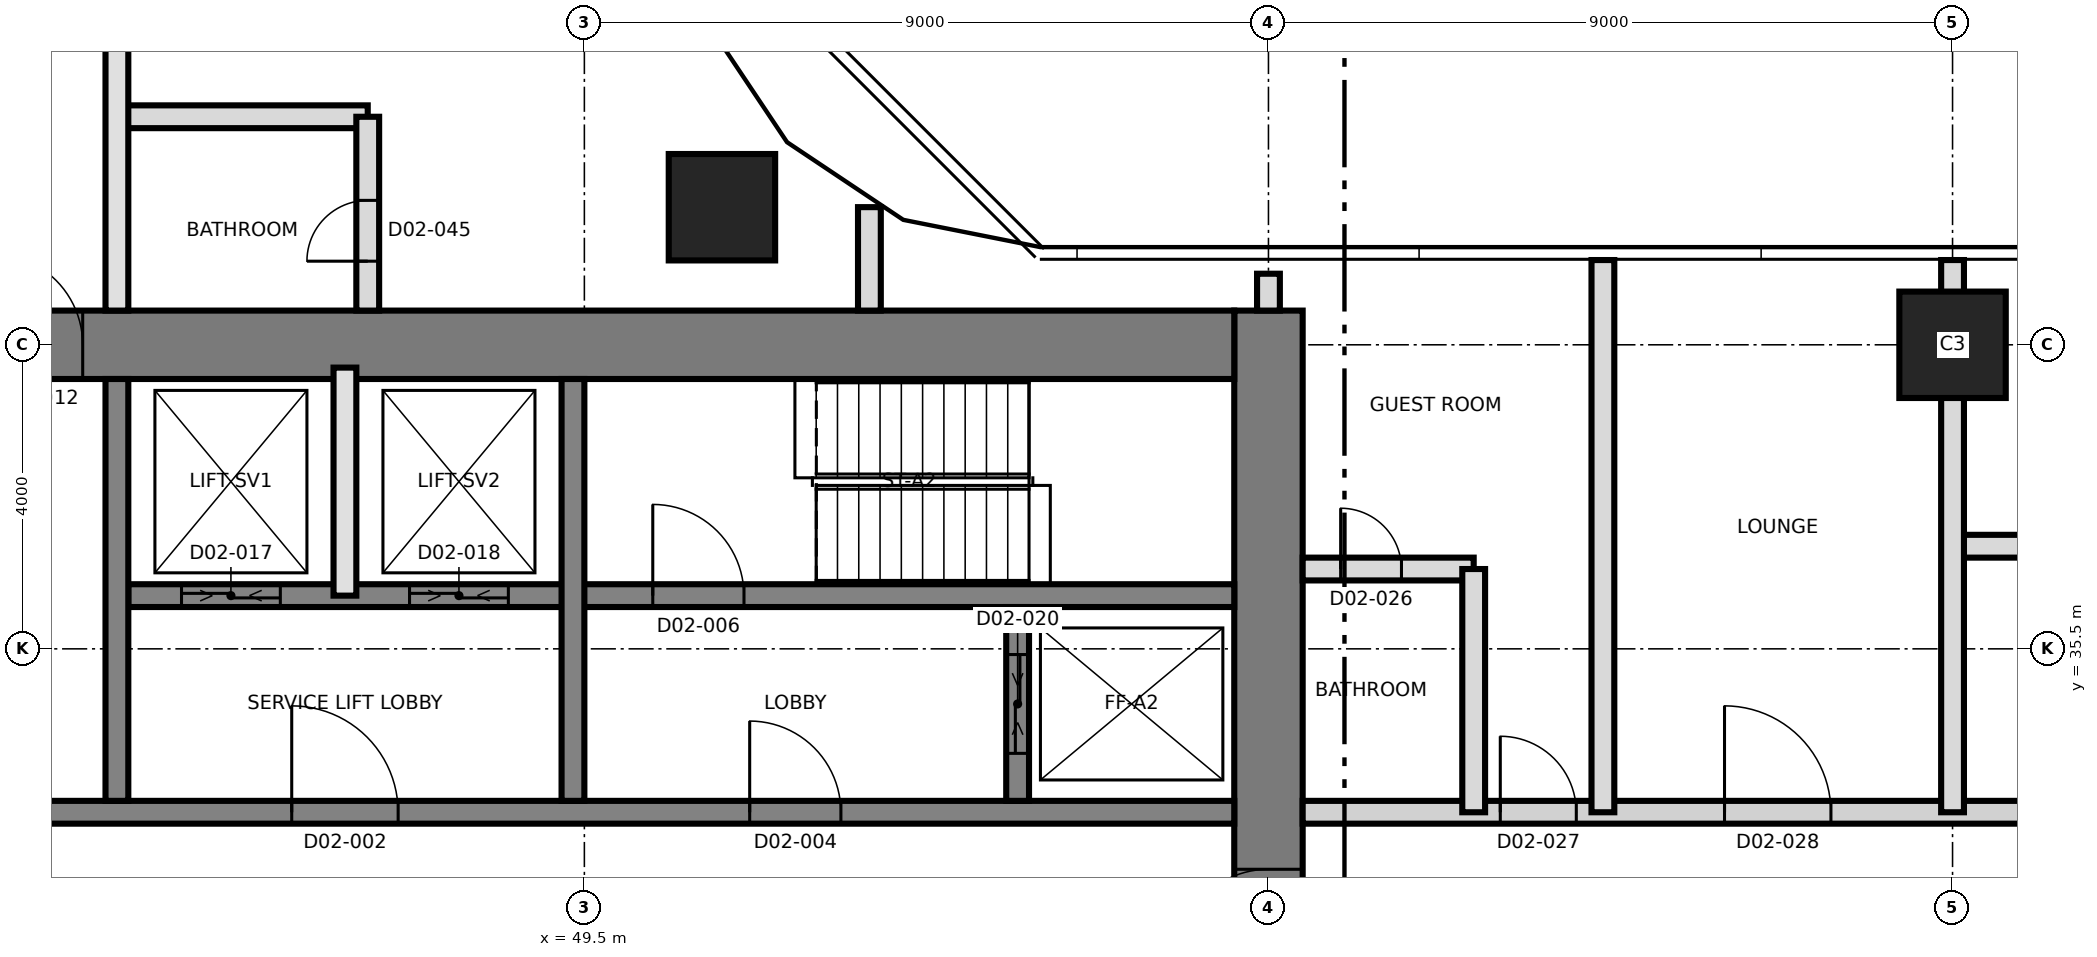
"""IFC4 building model, lengths in metres.
Left out: names, types, materials, properties, quantities, classifications, styles, units other than length and angle.
Written with IfcOpenShell. Run it as: python <this file> out.ifc"""

import sys

from ifc_helpers import new_model, si_unit, direction, frame, frame_2d, origin, origin_2d, place, context, subcontext, project, spatial, rectangle, extrude, element, fill, save


model = new_model("IFC4")
c1 = context("Model", 3, precision=1e-05, world=origin(), true_north=direction((0.0, 1.0)))
c2 = subcontext(c1, "Body", "Model", "MODEL_VIEW")
j1 = project(units=[si_unit("LENGTHUNIT", "METRE"), si_unit("PLANEANGLEUNIT", "RADIAN")], contexts=[c1])
p1 = place(None, origin())
s1 = spatial("IfcSite", under=j1, at=p1, CompositionType="ELEMENT")
p2 = place(p1, origin())
s2 = spatial("IfcBuilding", under=s1, at=p2, CompositionType="ELEMENT")
p3 = place(p2, frame((0.0, 0.0, 44.6)))
s3 = spatial("IfcBuildingStorey", under=s2, at=p3, CompositionType="ELEMENT", Elevation=44.6)
p4 = place(p3, frame((58.5, 21.05, 0.0), z_axis=(0.0, 0.0, 1.0), x_axis=(0.0, 1.0, 0.0)))
e1 = element("IfcWall", 1, at=p4, inside=s3, PredefinedType="SHEAR", context=c2, shape_type="SweptSolid", body=[
    extrude(rectangle(XDim=18.9, YDim=0.9, at=frame_2d((9.45, 0.0))), origin(), (0.0, 0.0, 1.0), 3.7),
])
p5 = place(p4, frame((10.35, 0.0, 0.0)))
e2 = element("IfcOpeningElement", 2, at=p5, cuts=e1, PredefinedType="OPENING", context=c2, shape_type="SweptSolid", body=[
    extrude(rectangle(XDim=1.2, YDim=2.1, at=frame_2d((0.6, 1.05))), frame((0.0, 0.46, 0.0), z_axis=(0.0, -1.0, 0.0), x_axis=(1.0, 0.0, 0.0)), (0.0, 0.0, 1.0), 0.92),
])
p6 = place(p3, frame((31.05, 39.5, 0.0), z_axis=(0.0, 0.0, 1.0), x_axis=(1.0, 0.0, 0.0)))
e3 = element("IfcWall", 3, at=p6, inside=s3, PredefinedType="SHEAR", context=c2, shape_type="SweptSolid", body=[
    extrude(rectangle(XDim=27.0, YDim=0.9, at=frame_2d((13.5, 0.0))), origin(), (0.0, 0.0, 1.0), 3.7),
])
p7 = place(p6, frame((10.65, 0.0, 0.0)))
e4 = element("IfcOpeningElement", 4, at=p7, cuts=e3, PredefinedType="OPENING", context=c2, shape_type="SweptSolid", body=[
    extrude(rectangle(XDim=1.2, YDim=2.1, at=frame_2d((0.6, 1.05))), frame((0.0, 0.46, 0.0), z_axis=(0.0, -1.0, 0.0), x_axis=(1.0, 0.0, 0.0)), (0.0, 0.0, 1.0), 0.92),
])
p8 = place(p3, frame((31.95, 33.35, 0.0), z_axis=(0.0, 0.0, 1.0), x_axis=(1.0, 0.0, 0.0)))
e5 = element("IfcWall", 5, at=p8, inside=s3, PredefinedType="SHEAR", context=c2, shape_type="SweptSolid", body=[
    extrude(rectangle(XDim=26.1, YDim=0.3, at=frame_2d((13.05, 0.0))), origin(), (0.0, 0.0, 1.0), 3.7),
])
p9 = place(p8, frame((13.7, 0.0, 0.0)))
e6 = element("IfcOpeningElement", 6, at=p9, cuts=e5, PredefinedType="OPENING", context=c2, shape_type="SweptSolid", body=[
    extrude(rectangle(XDim=1.4, YDim=2.1, at=frame_2d((0.7, 1.05))), frame((0.0, 0.16, 0.0), z_axis=(0.0, -1.0, 0.0), x_axis=(1.0, 0.0, 0.0)), (0.0, 0.0, 1.0), 0.32),
])
p10 = place(p8, frame((5.175, 0.0, 0.0)))
e7 = element("IfcOpeningElement", 7, at=p10, cuts=e5, PredefinedType="OPENING", context=c2, shape_type="SweptSolid", body=[
    extrude(rectangle(XDim=1.2, YDim=2.1, at=frame_2d((0.6, 1.05))), frame((0.0, 0.16, 0.0), z_axis=(0.0, -1.0, 0.0), x_axis=(1.0, 0.0, 0.0)), (0.0, 0.0, 1.0), 0.32),
])
p11 = place(p8, frame((19.725, 0.0, 0.0)))
e8 = element("IfcOpeningElement", 8, at=p11, cuts=e5, PredefinedType="OPENING", context=c2, shape_type="SweptSolid", body=[
    extrude(rectangle(XDim=1.2, YDim=2.1, at=frame_2d((0.6, 1.05))), frame((0.0, 0.16, 0.0), z_axis=(0.0, -1.0, 0.0), x_axis=(1.0, 0.0, 0.0)), (0.0, 0.0, 1.0), 0.32),
])
p12 = place(p3, frame((43.5, 36.2, 0.0), z_axis=(0.0, 0.0, 1.0), x_axis=(1.0, 0.0, 0.0)))
e9 = element("IfcWall", 9, at=p12, inside=s3, PredefinedType="SHEAR", context=c2, shape_type="SweptSolid", body=[
    extrude(rectangle(XDim=14.55, YDim=0.3, at=frame_2d((7.275, 0.0))), origin(), (0.0, 0.0, 1.0), 3.7),
])
p13 = place(p12, frame((6.9, 0.0, 0.0)))
e10 = element("IfcOpeningElement", 10, at=p13, cuts=e9, PredefinedType="OPENING", context=c2, shape_type="SweptSolid", body=[
    extrude(rectangle(XDim=1.2, YDim=2.1, at=frame_2d((0.6, 1.05))), frame((0.0, 0.16, 0.0), z_axis=(0.0, -1.0, 0.0), x_axis=(1.0, 0.0, 0.0)), (0.0, 0.0, 1.0), 0.32),
])
p14 = place(p12, frame((0.7, 0.0, 0.0)))
e11 = element("IfcOpeningElement", 11, at=p14, cuts=e9, PredefinedType="OPENING", context=c2, shape_type="SweptSolid", body=[
    extrude(rectangle(XDim=1.3, YDim=2.4, at=frame_2d((0.65, 1.2))), frame((0.0, 0.16, 0.0), z_axis=(0.0, -1.0, 0.0), x_axis=(1.0, 0.0, 0.0)), (0.0, 0.0, 1.0), 0.32),
])
p15 = place(p12, frame((3.7, 0.0, 0.0)))
e12 = element("IfcOpeningElement", 12, at=p15, cuts=e9, PredefinedType="OPENING", context=c2, shape_type="SweptSolid", body=[
    extrude(rectangle(XDim=1.3, YDim=2.4, at=frame_2d((0.65, 1.2))), frame((0.0, 0.16, 0.0), z_axis=(0.0, -1.0, 0.0), x_axis=(1.0, 0.0, 0.0)), (0.0, 0.0, 1.0), 0.32),
])
for number, where, z_axis, x_axis in (
    (13, (43.35, 33.5, 0.0), (0.0, 0.0, 1.0), (0.0, 1.0, 0.0)),
    (14, (49.35, 33.5, 0.0), (0.0, 0.0, 1.0), (0.0, 1.0, 0.0)),
):
    element("IfcWall", number, at=place(p3, frame(where, z_axis=z_axis, x_axis=x_axis)), inside=s3, PredefinedType="SHEAR", context=c2, shape_type="SweptSolid", body=[
        extrude(rectangle(XDim=5.55, YDim=0.3, at=frame_2d((2.775, 0.0))), origin(), (0.0, 0.0, 1.0), 3.7),
    ])
p16 = place(p3, frame((55.2, 33.5, 0.0), z_axis=(0.0, 0.0, 1.0), x_axis=(0.0, 1.0, 0.0)))
e15 = element("IfcWall", 15, at=p16, inside=s3, PredefinedType="SHEAR", context=c2, shape_type="SweptSolid", body=[
    extrude(rectangle(XDim=2.55, YDim=0.3, at=frame_2d((1.275, 0.0))), origin(), (0.0, 0.0, 1.0), 3.7),
])
p17 = place(p16, frame((0.625, 0.0, 0.0)))
e16 = element("IfcOpeningElement", 16, at=p17, cuts=e15, PredefinedType="OPENING", context=c2, shape_type="SweptSolid", body=[
    extrude(rectangle(XDim=1.3, YDim=2.4, at=frame_2d((0.65, 1.2))), frame((0.0, 0.16, 0.0), z_axis=(0.0, -1.0, 0.0), x_axis=(1.0, 0.0, 0.0)), (0.0, 0.0, 1.0), 0.32),
])
for number, where, z_axis, x_axis in (
    (17, (67.5, 39.5, 0.0), (0.0, 0.0, 1.0), (1.0, 0.0, 0.0)),
    (18, (51.31, 41.31, 0.0), (0.0, 0.0, 1.0), (1.0, 0.0, 0.0)),
):
    element("IfcColumn", number, at=place(p3, frame(where, z_axis=z_axis, x_axis=x_axis)), inside=s3, PredefinedType="COLUMN", context=c2, shape_type="SweptSolid", body=[
        extrude(rectangle(XDim=1.4, YDim=1.4, at=origin_2d()), origin(), (0.0, 0.0, 1.0), 3.7),
    ])
p18 = place(p3, frame((46.35, 36.2, 0.0), z_axis=(0.0, 0.0, 1.0), x_axis=(0.0, 1.0, 0.0)))
e19 = element("IfcWall", 19, at=p18, inside=s3, PredefinedType="SOLIDWALL", context=c2, shape_type="SweptSolid", body=[
    extrude(rectangle(XDim=3.0, YDim=0.3, at=frame_2d((1.5, 0.0))), origin(), (0.0, 0.0, 1.0), 3.4),
])
p19 = place(p3, frame((58.95, 33.35, 0.0), z_axis=(0.0, 0.0, 1.0), x_axis=(1.0, 0.0, 0.0)))
e20 = element("IfcWall", 20, at=p19, inside=s3, PredefinedType="PARTITIONING", context=c2, shape_type="SweptSolid", body=[
    extrude(rectangle(XDim=26.38, YDim=0.3, at=frame_2d((13.19, 0.0))), origin(), (0.0, 0.0, 1.0), 3.4),
])
p20 = place(p19, frame((2.6, 0.0, 0.0)))
e21 = element("IfcOpeningElement", 21, at=p20, cuts=e20, PredefinedType="OPENING", context=c2, shape_type="SweptSolid", body=[
    extrude(rectangle(XDim=1.0, YDim=2.1, at=frame_2d((0.5, 1.05))), frame((0.0, 0.16, 0.0), z_axis=(0.0, -1.0, 0.0), x_axis=(1.0, 0.0, 0.0)), (0.0, 0.0, 1.0), 0.32),
])
p21 = place(p19, frame((5.55, 0.0, 0.0)))
e22 = element("IfcOpeningElement", 22, at=p21, cuts=e20, PredefinedType="OPENING", context=c2, shape_type="SweptSolid", body=[
    extrude(rectangle(XDim=1.4, YDim=2.1, at=frame_2d((0.7, 1.05))), frame((0.0, 0.16, 0.0), z_axis=(0.0, -1.0, 0.0), x_axis=(1.0, 0.0, 0.0)), (0.0, 0.0, 1.0), 0.32),
])
p22 = place(p19, frame((14.2, 0.0, 0.0)))
e23 = element("IfcOpeningElement", 23, at=p22, cuts=e20, PredefinedType="OPENING", context=c2, shape_type="SweptSolid", body=[
    extrude(rectangle(XDim=1.0, YDim=2.4, at=frame_2d((0.5, 1.2))), frame((0.0, 0.16, 0.0), z_axis=(0.0, -1.0, 0.0), x_axis=(1.0, 0.0, 0.0)), (0.0, 0.0, 1.0), 0.32),
])
p23 = place(p19, frame((20.83, 0.0, 0.0)))
e24 = element("IfcOpeningElement", 24, at=p23, cuts=e20, PredefinedType="OPENING", context=c2, shape_type="SweptSolid", body=[
    extrude(rectangle(XDim=1.0, YDim=2.1, at=frame_2d((0.5, 1.05))), frame((0.0, 0.16, 0.0), z_axis=(0.0, -1.0, 0.0), x_axis=(1.0, 0.0, 0.0)), (0.0, 0.0, 1.0), 0.32),
])
p24 = place(p19, frame((22.63, 0.0, 0.0)))
e25 = element("IfcOpeningElement", 25, at=p24, cuts=e20, PredefinedType="OPENING", context=c2, shape_type="SweptSolid", body=[
    extrude(rectangle(XDim=1.0, YDim=2.1, at=frame_2d((0.5, 1.05))), frame((0.0, 0.16, 0.0), z_axis=(0.0, -1.0, 0.0), x_axis=(1.0, 0.0, 0.0)), (0.0, 0.0, 1.0), 0.32),
])
p25 = place(p3, frame((58.95, 36.55, 0.0), z_axis=(0.0, 0.0, 1.0), x_axis=(1.0, 0.0, 0.0)))
e26 = element("IfcWall", 26, at=p25, inside=s3, PredefinedType="PARTITIONING", context=c2, shape_type="SweptSolid", body=[
    extrude(rectangle(XDim=2.25, YDim=0.3, at=frame_2d((1.125, 0.0))), origin(), (0.0, 0.0, 1.0), 3.4),
])
p26 = place(p25, frame((0.5, 0.0, 0.0)))
e27 = element("IfcOpeningElement", 27, at=p26, cuts=e26, PredefinedType="OPENING", context=c2, shape_type="SweptSolid", body=[
    extrude(rectangle(XDim=0.8, YDim=2.1, at=frame_2d((0.4, 1.05))), frame((0.0, 0.16, 0.0), z_axis=(0.0, -1.0, 0.0), x_axis=(1.0, 0.0, 0.0)), (0.0, 0.0, 1.0), 0.32),
])
p27 = place(p3, frame((67.5, 36.85, 0.0), z_axis=(0.0, 0.0, 1.0), x_axis=(1.0, 0.0, 0.0)))
e28 = element("IfcWall", 28, at=p27, inside=s3, PredefinedType="PARTITIONING", context=c2, shape_type="SweptSolid", body=[
    extrude(rectangle(XDim=3.3, YDim=0.3, at=frame_2d((1.65, 0.0))), origin(), (0.0, 0.0, 1.0), 3.4),
])
p28 = place(p27, frame((1.25, 0.0, 0.0)))
e29 = element("IfcOpeningElement", 29, at=p28, cuts=e28, PredefinedType="OPENING", context=c2, shape_type="SweptSolid", body=[
    extrude(rectangle(XDim=0.8, YDim=2.1, at=frame_2d((0.4, 1.05))), frame((0.0, 0.16, 0.0), z_axis=(0.0, -1.0, 0.0), x_axis=(1.0, 0.0, 0.0)), (0.0, 0.0, 1.0), 0.32),
])
p29 = place(p3, frame((43.35, 42.5, 0.0), z_axis=(0.0, 0.0, 1.0), x_axis=(1.0, 0.0, 0.0)))
e30 = element("IfcWall", 30, at=p29, inside=s3, PredefinedType="PARTITIONING", context=c2, shape_type="SweptSolid", body=[
    extrude(rectangle(XDim=3.3, YDim=0.3, at=frame_2d((1.65, 0.0))), origin(), (0.0, 0.0, 1.0), 3.4),
])
p30 = place(p3, frame((43.35, 39.95, 0.0), z_axis=(0.0, 0.0, 1.0), x_axis=(0.0, 1.0, 0.0)))
e31 = element("IfcWall", 31, at=p30, inside=s3, PredefinedType="SOLIDWALL", context=c2, shape_type="SweptSolid", body=[
    extrude(rectangle(XDim=25.8, YDim=0.3, at=frame_2d((12.9, 0.0))), origin(), (0.0, 0.0, 1.0), 3.4),
])
p31 = place(p30, frame((3.55, 0.0, 0.0)))
e32 = element("IfcOpeningElement", 32, at=p31, cuts=e31, PredefinedType="OPENING", context=c2, shape_type="SweptSolid", body=[
    extrude(rectangle(XDim=1.0, YDim=2.4, at=frame_2d((0.5, 1.2))), frame((0.0, 0.16, 0.0), z_axis=(0.0, -1.0, 0.0), x_axis=(1.0, 0.0, 0.0)), (0.0, 0.0, 1.0), 0.32),
])
p32 = place(p30, frame((9.7, 0.0, 0.0)))
e33 = element("IfcOpeningElement", 33, at=p32, cuts=e31, PredefinedType="OPENING", context=c2, shape_type="SweptSolid", body=[
    extrude(rectangle(XDim=1.0, YDim=2.1, at=frame_2d((0.5, 1.05))), frame((0.0, 0.16, 0.0), z_axis=(0.0, -1.0, 0.0), x_axis=(1.0, 0.0, 0.0)), (0.0, 0.0, 1.0), 0.32),
])
p33 = place(p30, frame((15.55, 0.0, 0.0)))
e34 = element("IfcOpeningElement", 34, at=p33, cuts=e31, PredefinedType="OPENING", context=c2, shape_type="SweptSolid", body=[
    extrude(rectangle(XDim=1.0, YDim=2.1, at=frame_2d((0.5, 1.05))), frame((0.0, 0.16, 0.0), z_axis=(0.0, -1.0, 0.0), x_axis=(1.0, 0.0, 0.0)), (0.0, 0.0, 1.0), 0.32),
])
p34 = place(p30, frame((19.55, 0.0, 0.0)))
e35 = element("IfcOpeningElement", 35, at=p34, cuts=e31, PredefinedType="OPENING", context=c2, shape_type="SweptSolid", body=[
    extrude(rectangle(XDim=1.0, YDim=2.4, at=frame_2d((0.5, 1.2))), frame((0.0, 0.16, 0.0), z_axis=(0.0, -1.0, 0.0), x_axis=(1.0, 0.0, 0.0)), (0.0, 0.0, 1.0), 0.32),
])
p35 = place(p3, frame((46.65, 39.95, 0.0), z_axis=(0.0, 0.0, 1.0), x_axis=(0.0, 1.0, 0.0)))
e36 = element("IfcWall", 36, at=p35, inside=s3, PredefinedType="PARTITIONING", context=c2, shape_type="SweptSolid", body=[
    extrude(rectangle(XDim=2.55, YDim=0.3, at=frame_2d((1.275, 0.0))), origin(), (0.0, 0.0, 1.0), 3.4),
])
p36 = place(p35, frame((0.65, 0.0, 0.0)))
e37 = element("IfcOpeningElement", 37, at=p36, cuts=e36, PredefinedType="OPENING", context=c2, shape_type="SweptSolid", body=[
    extrude(rectangle(XDim=0.8, YDim=2.1, at=frame_2d((0.4, 1.05))), frame((0.0, 0.16, 0.0), z_axis=(0.0, -1.0, 0.0), x_axis=(1.0, 0.0, 0.0)), (0.0, 0.0, 1.0), 0.32),
])
p37 = place(p3, frame((53.25, 39.95, 0.0), z_axis=(0.0, 0.0, 1.0), x_axis=(0.0, 1.0, 0.0)))
e38 = element("IfcWall", 38, at=p37, inside=s3, PredefinedType="PARTITIONING", context=c2, shape_type="SweptSolid", body=[
    extrude(rectangle(XDim=1.361, YDim=0.3, at=frame_2d((0.681, 0.0))), origin(), (0.0, 0.0, 1.0), 3.4),
])
p38 = place(p3, frame((58.5, 39.95, 0.0), z_axis=(0.0, 0.0, 1.0), x_axis=(0.0, 1.0, 0.0)))
e39 = element("IfcWall", 39, at=p38, inside=s3, PredefinedType="PARTITIONING", context=c2, shape_type="SweptSolid", body=[
    extrude(rectangle(XDim=0.485, YDim=0.3, at=frame_2d((0.243, 0.0))), origin(), (0.0, 0.0, 1.0), 3.4),
])
p39 = place(p3, frame((61.2, 33.35, 0.0), z_axis=(0.0, 0.0, 1.0), x_axis=(0.0, 1.0, 0.0)))
e40 = element("IfcWall", 40, at=p39, inside=s3, PredefinedType="PARTITIONING", context=c2, shape_type="SweptSolid", body=[
    extrude(rectangle(XDim=3.2, YDim=0.3, at=frame_2d((1.6, 0.0))), origin(), (0.0, 0.0, 1.0), 3.4),
])
for number, where, z_axis, x_axis in (
    (41, (62.9, 33.35, 0.0), (0.0, 0.0, 1.0), (0.0, 1.0, 0.0)),
    (42, (67.5, 33.35, 0.0), (0.0, 0.0, 1.0), (0.0, 1.0, 0.0)),
):
    element("IfcWall", number, at=place(p3, frame(where, z_axis=z_axis, x_axis=x_axis)), inside=s3, PredefinedType="PARTITIONING", context=c2, shape_type="SweptSolid", body=[
        extrude(rectangle(XDim=7.265, YDim=0.3, at=frame_2d((3.632, 0.0))), origin(), (0.0, 0.0, 1.0), 3.4),
    ])
p40 = place(p9, origin())
e43 = element("IfcDoor", 43, at=p40, inside=s3, OperationType="SINGLE_SWING_RIGHT", PredefinedType="DOOR", context=c2, shape_type="SweptSolid", body=[
    extrude(rectangle(XDim=1.4, YDim=2.1, at=frame_2d((0.7, 1.05))), frame((0.0, 0.025, 0.0), z_axis=(0.0, -1.0, 0.0), x_axis=(1.0, 0.0, 0.0)), (0.0, 0.0, 1.0), 0.05),
])
fill(e6, e43)
p41 = place(p11, origin())
e44 = element("IfcDoor", 44, at=p41, inside=s3, OperationType="SINGLE_SWING_RIGHT", PredefinedType="DOOR", context=c2, shape_type="SweptSolid", body=[
    extrude(rectangle(XDim=1.2, YDim=2.1, at=frame_2d((0.6, 1.05))), frame((0.0, 0.025, 0.0), z_axis=(0.0, -1.0, 0.0), x_axis=(1.0, 0.0, 0.0)), (0.0, 0.0, 1.0), 0.05),
])
fill(e8, e44)
p42 = place(p13, origin())
e45 = element("IfcDoor", 45, at=p42, inside=s3, OperationType="SINGLE_SWING_LEFT", PredefinedType="DOOR", context=c2, shape_type="SweptSolid", body=[
    extrude(rectangle(XDim=1.2, YDim=2.1, at=frame_2d((0.6, 1.05))), frame((0.0, 0.025, 0.0), z_axis=(0.0, -1.0, 0.0), x_axis=(1.0, 0.0, 0.0)), (0.0, 0.0, 1.0), 0.05),
])
fill(e10, e45)
p43 = place(p5, origin())
e46 = element("IfcDoor", 46, at=p43, inside=s3, OperationType="SINGLE_SWING_LEFT", PredefinedType="DOOR", context=c2, shape_type="SweptSolid", body=[
    extrude(rectangle(XDim=1.2, YDim=2.1, at=frame_2d((0.6, 1.05))), frame((0.0, 0.025, 0.0), z_axis=(0.0, -1.0, 0.0), x_axis=(1.0, 0.0, 0.0)), (0.0, 0.0, 1.0), 0.05),
])
fill(e2, e46)
p44 = place(p7, origin())
e47 = element("IfcDoor", 47, at=p44, inside=s3, OperationType="SINGLE_SWING_RIGHT", PredefinedType="DOOR", context=c2, shape_type="SweptSolid", body=[
    extrude(rectangle(XDim=1.2, YDim=2.1, at=frame_2d((0.6, 1.05))), frame((0.0, 0.025, 0.0), z_axis=(0.0, -1.0, 0.0), x_axis=(1.0, 0.0, 0.0)), (0.0, 0.0, 1.0), 0.05),
])
fill(e4, e47)
p45 = place(p14, origin())
e48 = element("IfcDoor", 48, at=p45, inside=s3, OperationType="SLIDING_TO_LEFT", PredefinedType="DOOR", context=c2, shape_type="SweptSolid", body=[
    extrude(rectangle(XDim=1.3, YDim=2.4, at=frame_2d((0.65, 1.2))), frame((0.0, 0.025, 0.0), z_axis=(0.0, -1.0, 0.0), x_axis=(1.0, 0.0, 0.0)), (0.0, 0.0, 1.0), 0.05),
])
fill(e11, e48)
p46 = place(p15, origin())
e49 = element("IfcDoor", 49, at=p46, inside=s3, OperationType="SLIDING_TO_LEFT", PredefinedType="DOOR", context=c2, shape_type="SweptSolid", body=[
    extrude(rectangle(XDim=1.3, YDim=2.4, at=frame_2d((0.65, 1.2))), frame((0.0, 0.025, 0.0), z_axis=(0.0, -1.0, 0.0), x_axis=(1.0, 0.0, 0.0)), (0.0, 0.0, 1.0), 0.05),
])
fill(e12, e49)
p47 = place(p17, origin())
e50 = element("IfcDoor", 50, at=p47, inside=s3, OperationType="SLIDING_TO_LEFT", PredefinedType="DOOR", context=c2, shape_type="SweptSolid", body=[
    extrude(rectangle(XDim=1.3, YDim=2.4, at=frame_2d((0.65, 1.2))), frame((0.0, 0.025, 0.0), z_axis=(0.0, -1.0, 0.0), x_axis=(1.0, 0.0, 0.0)), (0.0, 0.0, 1.0), 0.05),
])
fill(e16, e50)
p48 = place(p26, origin())
e51 = element("IfcDoor", 51, at=p48, inside=s3, OperationType="SINGLE_SWING_LEFT", PredefinedType="DOOR", context=c2, shape_type="SweptSolid", body=[
    extrude(rectangle(XDim=0.8, YDim=2.1, at=frame_2d((0.4, 1.05))), frame((0.0, 0.025, 0.0), z_axis=(0.0, -1.0, 0.0), x_axis=(1.0, 0.0, 0.0)), (0.0, 0.0, 1.0), 0.05),
])
fill(e27, e51)
p49 = place(p20, origin())
e52 = element("IfcDoor", 52, at=p49, inside=s3, OperationType="SINGLE_SWING_LEFT", PredefinedType="DOOR", context=c2, shape_type="SweptSolid", body=[
    extrude(rectangle(XDim=1.0, YDim=2.1, at=frame_2d((0.5, 1.05))), frame((0.0, 0.025, 0.0), z_axis=(0.0, -1.0, 0.0), x_axis=(1.0, 0.0, 0.0)), (0.0, 0.0, 1.0), 0.05),
])
fill(e21, e52)
p50 = place(p21, origin())
e53 = element("IfcDoor", 53, at=p50, inside=s3, OperationType="SINGLE_SWING_RIGHT", PredefinedType="DOOR", context=c2, shape_type="SweptSolid", body=[
    extrude(rectangle(XDim=1.4, YDim=2.1, at=frame_2d((0.7, 1.05))), frame((0.0, 0.025, 0.0), z_axis=(0.0, -1.0, 0.0), x_axis=(1.0, 0.0, 0.0)), (0.0, 0.0, 1.0), 0.05),
])
fill(e22, e53)
p51 = place(p36, origin())
e54 = element("IfcDoor", 54, at=p51, inside=s3, OperationType="SINGLE_SWING_RIGHT", PredefinedType="DOOR", context=c2, shape_type="SweptSolid", body=[
    extrude(rectangle(XDim=0.8, YDim=2.1, at=frame_2d((0.4, 1.05))), frame((0.0, 0.025, 0.0), z_axis=(0.0, -1.0, 0.0), x_axis=(1.0, 0.0, 0.0)), (0.0, 0.0, 1.0), 0.05),
])
fill(e37, e54)
save(model, sys.argv[1])
